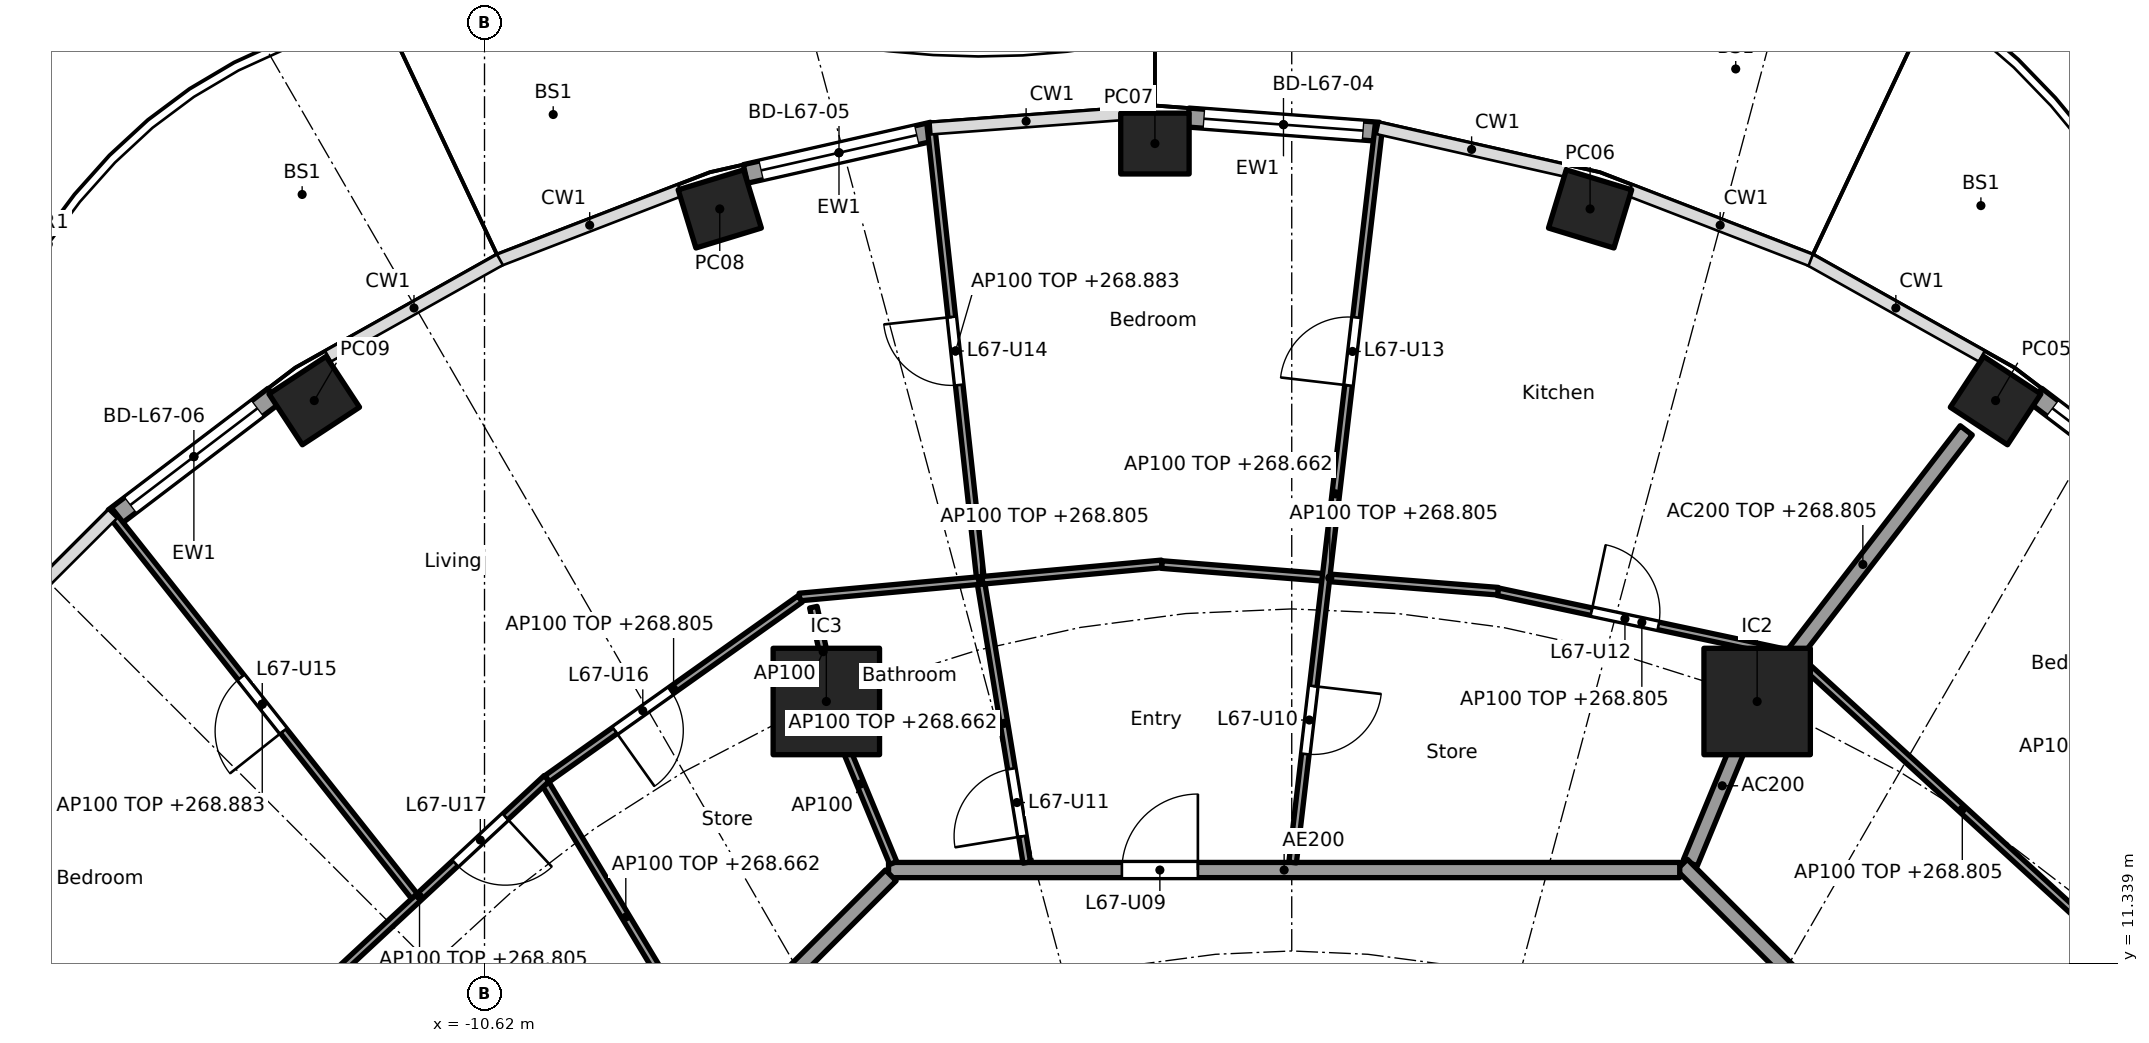
"""IFC4 building model, lengths in metres.
Left out: names, types, materials, properties, quantities, classifications, styles, units other than length and angle.
Written with IfcOpenShell. Run it as: python <this file> out.ifc"""

import sys

from ifc_helpers import new_model, si_unit, direction, frame, frame_2d, origin, origin_2d, place, context, subcontext, project, spatial, rectangle, hollow_rectangle, extrude, element, fill, save


model = new_model("IFC4")
c1 = context("Model", 3, precision=1e-05, world=origin(), true_north=direction((0.0, 1.0)))
c2 = subcontext(c1, "Body", "Model", "MODEL_VIEW")
j1 = project(units=[si_unit("LENGTHUNIT", "METRE"), si_unit("PLANEANGLEUNIT", "RADIAN")], contexts=[c1])
p1 = place(None, origin())
s1 = spatial("IfcSite", under=j1, at=p1, CompositionType="ELEMENT")
p2 = place(p1, origin())
s2 = spatial("IfcBuilding", under=s1, at=p2, CompositionType="ELEMENT")
p3 = place(p2, frame((0.0, 0.0, 265.9)))
s3 = spatial("IfcBuildingStorey", under=s2, at=p3, CompositionType="ELEMENT", Elevation=265.9)
for number, where, z_axis, x_axis in (
    (1, (9.26, 18.741, 0.0), (0.0, 0.0, 1.0), (-0.836, 0.549, 0.0)),
    (2, (3.925, 21.262, 0.0), (0.0, 0.0, 1.0), (-0.957, 0.292, 0.0)),
    (3, (-1.8, 22.122, 0.0), (0.0, 0.0, 1.0), (-1.0, 0.0, 0.0)),
    (4, (-7.525, 21.262, 0.0), (0.0, 0.0, 1.0), (-0.957, -0.292, 0.0)),
    (5, (-12.86, 18.741, 0.0), (0.0, 0.0, 1.0), (-0.836, -0.549, 0.0)),
):
    element("IfcColumn", number, at=place(p3, frame(where, z_axis=z_axis, x_axis=x_axis)), inside=s3, PredefinedType="COLUMN", context=c2, shape_type="SweptSolid", body=[
        extrude(hollow_rectangle(XDim=0.9, YDim=0.8, WallThickness=0.028, at=origin_2d()), origin(), (0.0, 0.0, 1.0), 3.7),
    ])
for number, where, z_axis, x_axis in (
    (6, (6.123, 14.782, 0.0), (0.0, 0.0, 1.0), (1.0, 0.0, 0.0)),
    (7, (-6.123, 14.782, 0.0), (0.0, 0.0, 1.0), (1.0, 0.0, 0.0)),
):
    element("IfcColumn", number, at=place(p3, frame(where, z_axis=z_axis, x_axis=x_axis)), inside=s3, PredefinedType="COLUMN", context=c2, shape_type="SweptSolid", body=[
        extrude(rectangle(XDim=1.4, YDim=1.4, at=origin_2d()), origin(), (0.0, 0.0, 1.0), 3.7),
    ])
p4 = place(p3, frame((9.792, 18.802, 0.0), z_axis=(0.0, 0.0, 1.0), x_axis=(0.796010739377, -0.605282498339, 0.0)))
e8 = element("IfcWall", 8, at=p4, inside=s3, PredefinedType="SOLIDWALL", context=c2, shape_type="SweptSolid", body=[
    extrude(rectangle(XDim=2.641, YDim=0.25, at=frame_2d((1.32, 0.0))), origin(), (0.0, 0.0, 1.0), 3.44),
])
p5 = place(p4, frame((0.27, 0.0, 0.0)))
e9 = element("IfcOpeningElement", 9, at=p5, cuts=e8, PredefinedType="OPENING", context=c2, shape_type="SweptSolid", body=[
    extrude(rectangle(XDim=2.1, YDim=2.4, at=frame_2d((1.05, 1.2))), frame((0.0, 0.135, 0.0), z_axis=(0.0, -1.0, 0.0), x_axis=(1.0, 0.0, 0.0)), (0.0, 0.0, 1.0), 0.27),
])
p6 = place(p3, frame((-1.361, 22.464, 0.0), z_axis=(0.0, 0.0, 1.0), x_axis=(0.997229684519, -0.074383844448, 0.0)))
e10 = element("IfcWall", 10, at=p6, inside=s3, PredefinedType="SOLIDWALL", context=c2, shape_type="SweptSolid", body=[
    extrude(rectangle(XDim=2.511, YDim=0.25, at=frame_2d((1.255, 0.0))), origin(), (0.0, 0.0, 1.0), 3.44),
])
p7 = place(p6, frame((0.205, 0.0, 0.0)))
e11 = element("IfcOpeningElement", 11, at=p7, cuts=e10, PredefinedType="OPENING", context=c2, shape_type="SweptSolid", body=[
    extrude(rectangle(XDim=2.1, YDim=2.4, at=frame_2d((1.05, 1.2))), frame((0.0, 0.135, 0.0), z_axis=(0.0, -1.0, 0.0), x_axis=(1.0, 0.0, 0.0)), (0.0, 0.0, 1.0), 0.27),
])
p8 = place(p3, frame((-7.188, 21.723, 0.0), z_axis=(0.0, 0.0, 1.0), x_axis=(0.975319584032, 0.220797891756, 0.0)))
e12 = element("IfcWall", 12, at=p8, inside=s3, PredefinedType="SOLIDWALL", context=c2, shape_type="SweptSolid", body=[
    extrude(rectangle(XDim=2.525, YDim=0.25, at=frame_2d((1.263, 0.0))), origin(), (0.0, 0.0, 1.0), 3.44),
])
p9 = place(p8, frame((0.213, 0.0, 0.0)))
e13 = element("IfcOpeningElement", 13, at=p9, cuts=e12, PredefinedType="OPENING", context=c2, shape_type="SweptSolid", body=[
    extrude(rectangle(XDim=2.1, YDim=2.4, at=frame_2d((1.05, 1.2))), frame((0.0, 0.135, 0.0), z_axis=(0.0, -1.0, 0.0), x_axis=(1.0, 0.0, 0.0)), (0.0, 0.0, 1.0), 0.27),
])
p10 = place(p3, frame((-15.495, 17.204, 0.0), z_axis=(0.0, 0.0, 1.0), x_axis=(0.796010739377, 0.605282498339, 0.0)))
e14 = element("IfcWall", 14, at=p10, inside=s3, PredefinedType="SOLIDWALL", context=c2, shape_type="SweptSolid", body=[
    extrude(rectangle(XDim=2.641, YDim=0.25, at=frame_2d((1.32, 0.0))), origin(), (0.0, 0.0, 1.0), 3.44),
])
p11 = place(p10, frame((0.27, 0.0, 0.0)))
e15 = element("IfcOpeningElement", 15, at=p11, cuts=e14, PredefinedType="OPENING", context=c2, shape_type="SweptSolid", body=[
    extrude(rectangle(XDim=2.1, YDim=2.4, at=frame_2d((1.05, 1.2))), frame((0.0, 0.135, 0.0), z_axis=(0.0, -1.0, 0.0), x_axis=(1.0, 0.0, 0.0)), (0.0, 0.0, 1.0), 0.27),
])
p12 = place(p3, frame((5.243, 12.657, 0.0), z_axis=(0.0, 0.0, 1.0), x_axis=(0.382691608661, 0.923876145736, 0.0)))
e16 = element("IfcWall", 16, at=p12, inside=s3, PredefinedType="PARTITIONING", context=c2, shape_type="SweptSolid", body=[
    extrude(rectangle(XDim=2.2, YDim=0.2, at=frame_2d((1.1, 0.0))), origin(), (0.0, 0.0, 1.0), 3.44),
])
p13 = place(p3, frame((6.154, 14.822, 0.0), z_axis=(0.0, 0.0, 1.0), x_axis=(0.610687612043, 0.791871606068, 0.0)))
e17 = element("IfcWall", 17, at=p13, inside=s3, PredefinedType="PARTITIONING", context=c2, shape_type="SweptSolid", body=[
    extrude(rectangle(XDim=4.455, YDim=0.2, at=frame_2d((2.228, 0.0))), origin(), (0.0, 0.0, 1.0), 2.905),
])
p14 = place(p3, frame((12.635, 5.134, 0.0), z_axis=(0.0, 0.0, 1.0), x_axis=(-0.707106781187, 0.707106781187, 0.0)))
e18 = element("IfcWall", 18, at=p14, inside=s3, PredefinedType="PARTITIONING", context=c2, shape_type="SweptSolid", body=[
    extrude(rectangle(XDim=10.609, YDim=0.2, at=frame_2d((5.305, 0.0))), origin(), (0.0, 0.0, 1.0), 3.44),
])
p15 = place(p3, frame((5.104, 12.565, 0.0), z_axis=(0.0, 0.0, 1.0), x_axis=(-1.0, 0.0, 0.0)))
e19 = element("IfcWall", 19, at=p15, inside=s3, PredefinedType="PARTITIONING", context=c2, shape_type="SweptSolid", body=[
    extrude(rectangle(XDim=10.409, YDim=0.2, at=frame_2d((5.205, 0.0))), origin(), (0.0, 0.0, 1.0), 3.44),
])
p16 = place(p15, frame((6.339, 0.0, 0.0)))
e20 = element("IfcOpeningElement", 20, at=p16, cuts=e19, PredefinedType="OPENING", context=c2, shape_type="SweptSolid", body=[
    extrude(rectangle(XDim=1.0, YDim=2.1, at=frame_2d((0.5, 1.05))), frame((0.0, 0.11, 0.0), z_axis=(0.0, -1.0, 0.0), x_axis=(1.0, 0.0, 0.0)), (0.0, 0.0, 1.0), 0.22),
])
p17 = place(p3, frame((-5.275, 12.494, 0.0), z_axis=(0.0, 0.0, 1.0), x_axis=(-0.707106781187, -0.707106781187, 0.0)))
e21 = element("IfcWall", 21, at=p17, inside=s3, PredefinedType="PARTITIONING", context=c2, shape_type="SweptSolid", body=[
    extrude(rectangle(XDim=10.209, YDim=0.2, at=frame_2d((5.104, 0.0))), origin(), (0.0, 0.0, 1.0), 3.44),
])
p18 = place(p3, frame((10.972, 11.398, 0.0), z_axis=(0.0, 0.0, 1.0), x_axis=(-0.737830272434, 0.674986288069, 0.0)))
e22 = element("IfcWall", 22, at=p18, inside=s3, PredefinedType="PARTITIONING", context=c2, shape_type="SweptSolid", body=[
    extrude(rectangle(XDim=5.827, YDim=0.1, at=frame_2d((2.914, 0.0))), origin(), (0.0, 0.0, 1.0), 2.905),
])
p19 = place(p3, frame((6.5, 15.419, 0.0), z_axis=(0.0, 0.0, 1.0), x_axis=(-0.978053492557, 0.208353943321, 0.0)))
e23 = element("IfcWall", 23, at=p19, inside=s3, PredefinedType="PARTITIONING", context=c2, shape_type="SweptSolid", body=[
    extrude(rectangle(XDim=3.874, YDim=0.1, at=frame_2d((1.937, 0.0))), origin(), (0.0, 0.0, 1.0), 2.905),
])
p20 = place(p19, frame((1.714, 0.0, 0.0)))
e24 = element("IfcOpeningElement", 24, at=p20, cuts=e23, PredefinedType="OPENING", context=c2, shape_type="SweptSolid", body=[
    extrude(rectangle(XDim=0.9, YDim=2.1, at=frame_2d((0.45, 1.05))), frame((0.0, 0.06, 0.0), z_axis=(0.0, -1.0, 0.0), x_axis=(1.0, 0.0, 0.0)), (0.0, 0.0, 1.0), 0.12),
])
p21 = place(p3, frame((2.713, 16.233, 0.0), z_axis=(0.0, 0.0, 1.0), x_axis=(-0.996870142942, 0.079056423588, 0.0)))
e25 = element("IfcWall", 25, at=p21, inside=s3, PredefinedType="PARTITIONING", context=c2, shape_type="SweptSolid", body=[
    extrude(rectangle(XDim=4.438, YDim=0.1, at=frame_2d((2.219, 0.0))), origin(), (0.0, 0.0, 1.0), 2.905),
])
p22 = place(p3, frame((0.012, 12.664, 0.0), z_axis=(0.0, 0.0, 1.0), x_axis=(0.11636251357, 0.993206808996, 0.0)))
e26 = element("IfcWall", 26, at=p22, inside=s3, PredefinedType="PARTITIONING", context=c2, shape_type="SweptSolid", body=[
    extrude(rectangle(XDim=9.765, YDim=0.1, at=frame_2d((4.882, 0.0))), origin(), (0.0, 0.0, 1.0), 2.762),
])
p23 = place(p22, frame((1.437, 0.0, 0.0)))
e27 = element("IfcOpeningElement", 27, at=p23, cuts=e26, PredefinedType="OPENING", context=c2, shape_type="SweptSolid", body=[
    extrude(rectangle(XDim=0.9, YDim=2.1, at=frame_2d((0.45, 1.05))), frame((0.0, 0.06, 0.0), z_axis=(0.0, -1.0, 0.0), x_axis=(1.0, 0.0, 0.0)), (0.0, 0.0, 1.0), 0.12),
])
p24 = place(p22, frame((6.319, 0.0, 0.0)))
e28 = element("IfcOpeningElement", 28, at=p24, cuts=e26, PredefinedType="OPENING", context=c2, shape_type="SweptSolid", body=[
    extrude(rectangle(XDim=0.9, YDim=2.1, at=frame_2d((0.45, 1.05))), frame((0.0, 0.06, 0.0), z_axis=(0.0, -1.0, 0.0), x_axis=(1.0, 0.0, 0.0)), (0.0, 0.0, 1.0), 0.12),
])
p25 = place(p3, frame((-1.711, 16.592, 0.0), z_axis=(0.0, 0.0, 1.0), x_axis=(-0.995843707015, -0.091078599017, 0.0)))
e29 = element("IfcWall", 29, at=p25, inside=s3, PredefinedType="PARTITIONING", context=c2, shape_type="SweptSolid", body=[
    extrude(rectangle(XDim=4.785, YDim=0.1, at=frame_2d((2.392, 0.0))), origin(), (0.0, 0.0, 1.0), 2.905),
])
p26 = place(p3, frame((-3.486, 12.663, 0.0), z_axis=(0.0, 0.0, 1.0), x_axis=(-0.161602751674, 0.986855891532, 0.0)))
e30 = element("IfcWall", 30, at=p26, inside=s3, PredefinedType="PARTITIONING", context=c2, shape_type="SweptSolid", body=[
    extrude(rectangle(XDim=3.71, YDim=0.1, at=frame_2d((1.855, 0.0))), origin(), (0.0, 0.0, 1.0), 2.762),
])
p27 = place(p26, frame((0.35, 0.0, 0.0)))
e31 = element("IfcOpeningElement", 31, at=p27, cuts=e30, PredefinedType="OPENING", context=c2, shape_type="SweptSolid", body=[
    extrude(rectangle(XDim=0.9, YDim=2.1, at=frame_2d((0.45, 1.05))), frame((0.0, 0.06, 0.0), z_axis=(0.0, -1.0, 0.0), x_axis=(1.0, 0.0, 0.0)), (0.0, 0.0, 1.0), 0.12),
])
p28 = place(p3, frame((-4.099, 16.424, 0.0), z_axis=(0.0, 0.0, 1.0), x_axis=(-0.10867295252, 0.99407755703, 0.0)))
e32 = element("IfcWall", 32, at=p28, inside=s3, PredefinedType="PARTITIONING", context=c2, shape_type="SweptSolid", body=[
    extrude(rectangle(XDim=5.974, YDim=0.1, at=frame_2d((2.987, 0.0))), origin(), (0.0, 0.0, 1.0), 2.983),
])
p29 = place(p28, frame((2.537, 0.0, 0.0)))
e33 = element("IfcOpeningElement", 33, at=p29, cuts=e32, PredefinedType="OPENING", context=c2, shape_type="SweptSolid", body=[
    extrude(rectangle(XDim=0.9, YDim=2.1, at=frame_2d((0.45, 1.05))), frame((0.0, 0.06, 0.0), z_axis=(0.0, -1.0, 0.0), x_axis=(1.0, 0.0, 0.0)), (0.0, 0.0, 1.0), 0.12),
])
p30 = place(p3, frame((-5.243, 12.657, 0.0), z_axis=(0.0, 0.0, 1.0), x_axis=(-0.382719158442, 0.923864733477, 0.0)))
e34 = element("IfcWall", 34, at=p30, inside=s3, PredefinedType="PARTITIONING", context=c2, shape_type="SweptSolid", body=[
    extrude(rectangle(XDim=2.25, YDim=0.1, at=frame_2d((1.125, 0.0))), origin(), (0.0, 0.0, 1.0), 3.44),
])
p31 = place(p3, frame((-6.467, 16.132, 0.0), z_axis=(0.0, 0.0, 1.0), x_axis=(-0.815192286069, -0.579190414919, 0.0)))
e35 = element("IfcWall", 35, at=p31, inside=s3, PredefinedType="PARTITIONING", context=c2, shape_type="SweptSolid", body=[
    extrude(rectangle(XDim=4.086, YDim=0.1, at=frame_2d((2.043, 0.0))), origin(), (0.0, 0.0, 1.0), 2.905),
])
p32 = place(p31, frame((2.09, 0.0, 0.0)))
e36 = element("IfcOpeningElement", 36, at=p32, cuts=e35, PredefinedType="OPENING", context=c2, shape_type="SweptSolid", body=[
    extrude(rectangle(XDim=0.9, YDim=2.1, at=frame_2d((0.45, 1.05))), frame((0.0, 0.06, 0.0), z_axis=(0.0, -1.0, 0.0), x_axis=(1.0, 0.0, 0.0)), (0.0, 0.0, 1.0), 0.12),
])
p33 = place(p3, frame((-7.709, 10.197, 0.0), z_axis=(0.0, 0.0, 1.0), x_axis=(-0.515524871668, 0.856874615502, 0.0)))
e37 = element("IfcWall", 37, at=p33, inside=s3, PredefinedType="PARTITIONING", context=c2, shape_type="SweptSolid", body=[
    extrude(rectangle(XDim=4.08, YDim=0.1, at=frame_2d((2.04, 0.0))), origin(), (0.0, 0.0, 1.0), 2.762),
])
p34 = place(p3, frame((-9.802, 13.77, 0.0), z_axis=(0.0, 0.0, 1.0), x_axis=(-0.732662099478, -0.680592571212, 0.0)))
e38 = element("IfcWall", 38, at=p34, inside=s3, PredefinedType="PARTITIONING", context=c2, shape_type="SweptSolid", body=[
    extrude(rectangle(XDim=4.567, YDim=0.1, at=frame_2d((2.283, 0.0))), origin(), (0.0, 0.0, 1.0), 2.905),
])
p35 = place(p34, frame((0.742, 0.0, 0.0)))
e39 = element("IfcOpeningElement", 39, at=p35, cuts=e38, PredefinedType="OPENING", context=c2, shape_type="SweptSolid", body=[
    extrude(rectangle(XDim=0.9, YDim=2.1, at=frame_2d((0.45, 1.05))), frame((0.0, 0.06, 0.0), z_axis=(0.0, -1.0, 0.0), x_axis=(1.0, 0.0, 0.0)), (0.0, 0.0, 1.0), 0.12),
])
p36 = place(p3, frame((-11.543, 12.221, 0.0), z_axis=(0.0, 0.0, 1.0), x_axis=(-0.621117202271, 0.783717692185, 0.0)))
e40 = element("IfcWall", 40, at=p36, inside=s3, PredefinedType="PARTITIONING", context=c2, shape_type="SweptSolid", body=[
    extrude(rectangle(XDim=6.444, YDim=0.1, at=frame_2d((3.222, 0.0))), origin(), (0.0, 0.0, 1.0), 2.983),
])
p37 = place(p36, frame((2.772, 0.0, 0.0)))
e41 = element("IfcOpeningElement", 41, at=p37, cuts=e40, PredefinedType="OPENING", context=c2, shape_type="SweptSolid", body=[
    extrude(rectangle(XDim=0.9, YDim=2.1, at=frame_2d((0.45, 1.05))), frame((0.0, 0.06, 0.0), z_axis=(0.0, -1.0, 0.0), x_axis=(1.0, 0.0, 0.0)), (0.0, 0.0, 1.0), 0.12),
])
p38 = place(p3, frame((-6.036, 14.853, 0.0), z_axis=(0.0, 0.0, 1.0), x_axis=(-0.215009518078, 0.976611953202, 0.0)))
e42 = element("IfcWall", 42, at=p38, inside=s3, PredefinedType="PARTITIONING", context=c2, shape_type="SweptSolid", body=[
    extrude(rectangle(XDim=1.198, YDim=0.1, at=frame_2d((0.599, 0.0))), origin(), (0.0, 0.0, 1.0), 3.44),
])
p39 = place(p5, origin())
e43 = element("IfcDoor", 43, at=p39, inside=s3, OperationType="SLIDING_TO_LEFT", PredefinedType="DOOR", context=c2, shape_type="SweptSolid", body=[
    extrude(rectangle(XDim=2.1, YDim=2.4, at=frame_2d((1.05, 1.2))), frame((0.0, 0.025, 0.0), z_axis=(0.0, -1.0, 0.0), x_axis=(1.0, 0.0, 0.0)), (0.0, 0.0, 1.0), 0.05),
])
fill(e9, e43)
p40 = place(p7, origin())
e44 = element("IfcDoor", 44, at=p40, inside=s3, OperationType="SLIDING_TO_LEFT", PredefinedType="DOOR", context=c2, shape_type="SweptSolid", body=[
    extrude(rectangle(XDim=2.1, YDim=2.4, at=frame_2d((1.05, 1.2))), frame((0.0, 0.025, 0.0), z_axis=(0.0, -1.0, 0.0), x_axis=(1.0, 0.0, 0.0)), (0.0, 0.0, 1.0), 0.05),
])
fill(e11, e44)
p41 = place(p9, origin())
e45 = element("IfcDoor", 45, at=p41, inside=s3, OperationType="SLIDING_TO_LEFT", PredefinedType="DOOR", context=c2, shape_type="SweptSolid", body=[
    extrude(rectangle(XDim=2.1, YDim=2.4, at=frame_2d((1.05, 1.2))), frame((0.0, 0.025, 0.0), z_axis=(0.0, -1.0, 0.0), x_axis=(1.0, 0.0, 0.0)), (0.0, 0.0, 1.0), 0.05),
])
fill(e13, e45)
p42 = place(p11, origin())
e46 = element("IfcDoor", 46, at=p42, inside=s3, OperationType="SLIDING_TO_LEFT", PredefinedType="DOOR", context=c2, shape_type="SweptSolid", body=[
    extrude(rectangle(XDim=2.1, YDim=2.4, at=frame_2d((1.05, 1.2))), frame((0.0, 0.025, 0.0), z_axis=(0.0, -1.0, 0.0), x_axis=(1.0, 0.0, 0.0)), (0.0, 0.0, 1.0), 0.05),
])
fill(e15, e46)
p43 = place(p16, frame((1.0, 0.0, 0.0), x_axis=(-1.0, 0.0, 0.0)))
e47 = element("IfcDoor", 47, at=p43, inside=s3, OperationType="SINGLE_SWING_RIGHT", PredefinedType="DOOR", context=c2, shape_type="SweptSolid", body=[
    extrude(rectangle(XDim=1.0, YDim=2.1, at=frame_2d((0.5, 1.05))), frame((0.0, 0.025, 0.0), z_axis=(0.0, -1.0, 0.0), x_axis=(1.0, 0.0, 0.0)), (0.0, 0.0, 1.0), 0.05),
])
fill(e20, e47)
p44 = place(p23, frame((0.9, 0.0, 0.0), x_axis=(-1.0, 0.0, 0.0)))
e48 = element("IfcDoor", 48, at=p44, inside=s3, OperationType="SINGLE_SWING_LEFT", PredefinedType="DOOR", context=c2, shape_type="SweptSolid", body=[
    extrude(rectangle(XDim=0.9, YDim=2.1, at=frame_2d((0.45, 1.05))), frame((0.0, 0.025, 0.0), z_axis=(0.0, -1.0, 0.0), x_axis=(1.0, 0.0, 0.0)), (0.0, 0.0, 1.0), 0.05),
])
fill(e27, e48)
p45 = place(p27, origin())
e49 = element("IfcDoor", 49, at=p45, inside=s3, OperationType="SINGLE_SWING_LEFT", PredefinedType="DOOR", context=c2, shape_type="SweptSolid", body=[
    extrude(rectangle(XDim=0.9, YDim=2.1, at=frame_2d((0.45, 1.05))), frame((0.0, 0.025, 0.0), z_axis=(0.0, -1.0, 0.0), x_axis=(1.0, 0.0, 0.0)), (0.0, 0.0, 1.0), 0.05),
])
fill(e31, e49)
p46 = place(p20, frame((0.9, 0.0, 0.0), x_axis=(-1.0, 0.0, 0.0)))
e50 = element("IfcDoor", 50, at=p46, inside=s3, OperationType="SINGLE_SWING_LEFT", PredefinedType="DOOR", context=c2, shape_type="SweptSolid", body=[
    extrude(rectangle(XDim=0.9, YDim=2.1, at=frame_2d((0.45, 1.05))), frame((0.0, 0.025, 0.0), z_axis=(0.0, -1.0, 0.0), x_axis=(1.0, 0.0, 0.0)), (0.0, 0.0, 1.0), 0.05),
])
fill(e24, e50)
p47 = place(p24, origin())
e51 = element("IfcDoor", 51, at=p47, inside=s3, OperationType="SINGLE_SWING_LEFT", PredefinedType="DOOR", context=c2, shape_type="SweptSolid", body=[
    extrude(rectangle(XDim=0.9, YDim=2.1, at=frame_2d((0.45, 1.05))), frame((0.0, 0.025, 0.0), z_axis=(0.0, -1.0, 0.0), x_axis=(1.0, 0.0, 0.0)), (0.0, 0.0, 1.0), 0.05),
])
fill(e28, e51)
p48 = place(p29, origin())
e52 = element("IfcDoor", 52, at=p48, inside=s3, OperationType="SINGLE_SWING_RIGHT", PredefinedType="DOOR", context=c2, shape_type="SweptSolid", body=[
    extrude(rectangle(XDim=0.9, YDim=2.1, at=frame_2d((0.45, 1.05))), frame((0.0, 0.025, 0.0), z_axis=(0.0, -1.0, 0.0), x_axis=(1.0, 0.0, 0.0)), (0.0, 0.0, 1.0), 0.05),
])
fill(e33, e52)
p49 = place(p37, origin())
e53 = element("IfcDoor", 53, at=p49, inside=s3, OperationType="SINGLE_SWING_LEFT", PredefinedType="DOOR", context=c2, shape_type="SweptSolid", body=[
    extrude(rectangle(XDim=0.9, YDim=2.1, at=frame_2d((0.45, 1.05))), frame((0.0, 0.025, 0.0), z_axis=(0.0, -1.0, 0.0), x_axis=(1.0, 0.0, 0.0)), (0.0, 0.0, 1.0), 0.05),
])
fill(e41, e53)
p50 = place(p32, origin())
e54 = element("IfcDoor", 54, at=p50, inside=s3, OperationType="SINGLE_SWING_RIGHT", PredefinedType="DOOR", context=c2, shape_type="SweptSolid", body=[
    extrude(rectangle(XDim=0.9, YDim=2.1, at=frame_2d((0.45, 1.05))), frame((0.0, 0.025, 0.0), z_axis=(0.0, -1.0, 0.0), x_axis=(1.0, 0.0, 0.0)), (0.0, 0.0, 1.0), 0.05),
])
fill(e36, e54)
p51 = place(p35, origin())
e55 = element("IfcDoor", 55, at=p51, inside=s3, OperationType="SINGLE_SWING_LEFT", PredefinedType="DOOR", context=c2, shape_type="SweptSolid", body=[
    extrude(rectangle(XDim=0.9, YDim=2.1, at=frame_2d((0.45, 1.05))), frame((0.0, 0.025, 0.0), z_axis=(0.0, -1.0, 0.0), x_axis=(1.0, 0.0, 0.0)), (0.0, 0.0, 1.0), 0.05),
])
fill(e39, e55)
save(model, sys.argv[1])
